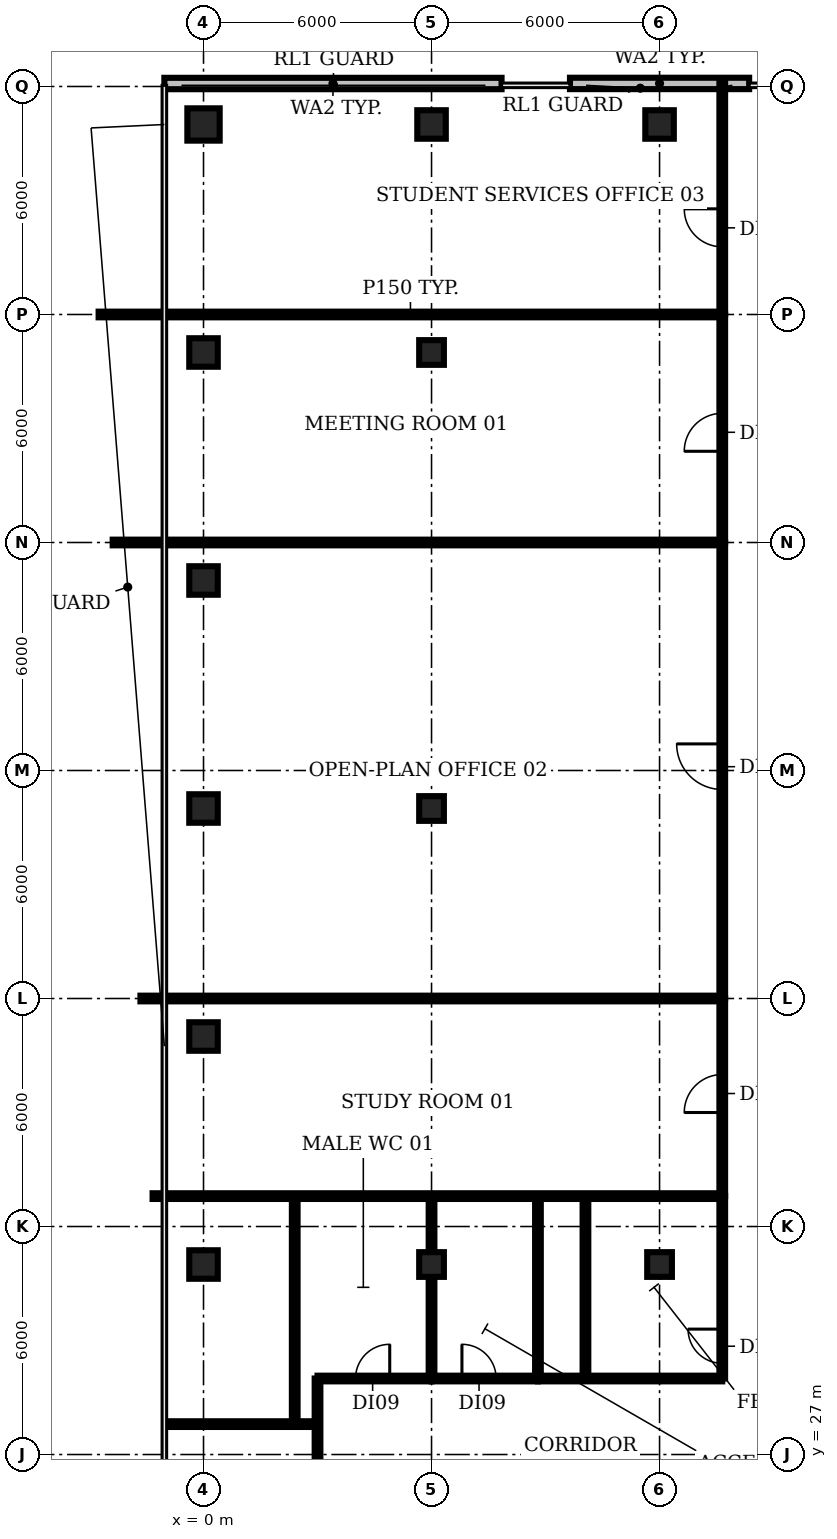
"""IFC4 building model, lengths in metres.
Left out: names, types, materials, properties, quantities, classifications, styles, units other than length and angle.
Written with IfcOpenShell. Run it as: python <this file> out.ifc"""

import sys

from ifc_helpers import new_model, si_unit, direction, frame, frame_2d, origin, origin_2d, place, context, subcontext, project, spatial, rectangle, circle, extrude, element, fill, save


model = new_model("IFC4")
c1 = context("Model", 3, precision=1e-05, world=origin(), true_north=direction((0.0, 1.0)))
c2 = subcontext(c1, "Body", "Model", "MODEL_VIEW")
j1 = project(units=[si_unit("LENGTHUNIT", "METRE"), si_unit("PLANEANGLEUNIT", "RADIAN")], contexts=[c1])
p1 = place(None, origin())
s1 = spatial("IfcSite", under=j1, at=p1, CompositionType="ELEMENT")
p2 = place(p1, origin())
s2 = spatial("IfcBuilding", under=s1, at=p2, CompositionType="ELEMENT")
p3 = place(p2, frame((0.0, 0.0, 302.0)))
s3 = spatial("IfcBuildingStorey", under=s2, at=p3, CompositionType="ELEMENT", Elevation=302.0)
for number, where, z_axis, x_axis in (
    (1, (0.0, 32.0, 0.0), (0.0, 0.0, 1.0), (1.0, 0.0, 0.0)),
    (2, (0.0, 38.0, 0.0), (0.0, 0.0, 1.0), (1.0, 0.0, 0.0)),
    (3, (0.0, 44.0, 0.0), (0.0, 0.0, 1.0), (1.0, 0.0, 0.0)),
    (4, (0.0, 50.0, 0.0), (0.0, 0.0, 1.0), (1.0, 0.0, 0.0)),
    (5, (0.0, 56.0, 0.0), (0.0, 0.0, 1.0), (1.0, 0.0, 0.0)),
):
    element("IfcColumn", number, at=place(p3, frame(where, z_axis=z_axis, x_axis=x_axis)), inside=s3, PredefinedType="COLUMN", context=c2, shape_type="SweptSolid", body=[
        extrude(rectangle(XDim=0.75, YDim=0.75, at=origin_2d()), origin(), (0.0, 0.0, 1.0), 3.85),
    ])
p4 = place(p3, frame((0.0, 62.0, 0.0), z_axis=(0.0, 0.0, 1.0), x_axis=(1.0, 0.0, 0.0)))
e6 = element("IfcColumn", 6, at=p4, inside=s3, PredefinedType="COLUMN", context=c2, shape_type="SweptSolid", body=[
    extrude(circle(Radius=0.425, at=origin_2d()), origin(), (0.0, 0.0, 1.0), 3.85),
])
for number, where, z_axis, x_axis in (
    (7, (6.0, 32.0, 0.0), (0.0, 0.0, 1.0), (1.0, 0.0, 0.0)),
    (8, (6.0, 44.0, 0.0), (0.0, 0.0, 1.0), (1.0, 0.0, 0.0)),
    (9, (6.0, 56.0, 0.0), (0.0, 0.0, 1.0), (1.0, 0.0, 0.0)),
):
    element("IfcColumn", number, at=place(p3, frame(where, z_axis=z_axis, x_axis=x_axis)), inside=s3, PredefinedType="COLUMN", context=c2, shape_type="SweptSolid", body=[
        extrude(rectangle(XDim=0.65, YDim=0.65, at=origin_2d()), origin(), (0.0, 0.0, 1.0), 3.85),
    ])
p5 = place(p3, frame((6.0, 62.0, 0.0), z_axis=(0.0, 0.0, 1.0), x_axis=(1.0, 0.0, 0.0)))
e10 = element("IfcColumn", 10, at=p5, inside=s3, PredefinedType="COLUMN", context=c2, shape_type="SweptSolid", body=[
    extrude(rectangle(XDim=0.75, YDim=0.75, at=origin_2d()), origin(), (0.0, 0.0, 1.0), 3.85),
])
p6 = place(p3, frame((12.0, 32.0, 0.0), z_axis=(0.0, 0.0, 1.0), x_axis=(1.0, 0.0, 0.0)))
e11 = element("IfcColumn", 11, at=p6, inside=s3, PredefinedType="COLUMN", context=c2, shape_type="SweptSolid", body=[
    extrude(rectangle(XDim=0.65, YDim=0.65, at=origin_2d()), origin(), (0.0, 0.0, 1.0), 3.85),
])
p7 = place(p3, frame((12.0, 62.0, 0.0), z_axis=(0.0, 0.0, 1.0), x_axis=(1.0, 0.0, 0.0)))
e12 = element("IfcColumn", 12, at=p7, inside=s3, PredefinedType="COLUMN", context=c2, shape_type="SweptSolid", body=[
    extrude(rectangle(XDim=0.75, YDim=0.75, at=origin_2d()), origin(), (0.0, 0.0, 1.0), 3.85),
])
p8 = place(p3, frame((14.357, 63.08, 0.0), z_axis=(0.0, 0.0, 1.0), x_axis=(-1.0, 0.0, 0.0)))
e13 = element("IfcWall", 13, at=p8, inside=s3, PredefinedType="SOLIDWALL", context=c2, shape_type="SweptSolid", body=[
    extrude(rectangle(XDim=4.715, YDim=0.3, at=frame_2d((2.357, 0.0))), origin(), (0.0, 0.0, 1.0), 3.85),
])
p9 = place(p3, frame((7.843, 63.078, 0.0), z_axis=(0.0, 0.0, 1.0), x_axis=(-1.0, 0.0, 0.0)))
e14 = element("IfcWall", 14, at=p9, inside=s3, PredefinedType="SOLIDWALL", context=c2, shape_type="SweptSolid", body=[
    extrude(rectangle(XDim=8.873, YDim=0.3, at=frame_2d((4.436, 0.0))), origin(), (0.0, 0.0, 1.0), 3.85),
])
p10 = place(p3, frame((-2.76, 57.0, 0.0), z_axis=(0.0, 0.0, 1.0), x_axis=(1.0, 0.0, 0.0)))
e15 = element("IfcWall", 15, at=p10, inside=s3, PredefinedType="PARTITIONING", context=c2, shape_type="SweptSolid", body=[
    extrude(rectangle(XDim=16.41, YDim=0.15, at=frame_2d((8.205, 0.0))), origin(), (0.0, 0.0, 1.0), 2.9),
])
p11 = place(p3, frame((-2.39, 51.0, 0.0), z_axis=(0.0, 0.0, 1.0), x_axis=(1.0, 0.0, 0.0)))
e16 = element("IfcWall", 16, at=p11, inside=s3, PredefinedType="PARTITIONING", context=c2, shape_type="SweptSolid", body=[
    extrude(rectangle(XDim=16.04, YDim=0.15, at=frame_2d((8.02, 0.0))), origin(), (0.0, 0.0, 1.0), 2.9),
])
p12 = place(p3, frame((-1.66, 39.0, 0.0), z_axis=(0.0, 0.0, 1.0), x_axis=(1.0, 0.0, 0.0)))
e17 = element("IfcWall", 17, at=p12, inside=s3, PredefinedType="PARTITIONING", context=c2, shape_type="SweptSolid", body=[
    extrude(rectangle(XDim=15.31, YDim=0.15, at=frame_2d((7.655, 0.0))), origin(), (0.0, 0.0, 1.0), 2.9),
])
p13 = place(p3, frame((-1.34, 33.8, 0.0), z_axis=(0.0, 0.0, 1.0), x_axis=(1.0, 0.0, 0.0)))
e18 = element("IfcWall", 18, at=p13, inside=s3, PredefinedType="PARTITIONING", context=c2, shape_type="SweptSolid", body=[
    extrude(rectangle(XDim=14.99, YDim=0.15, at=frame_2d((7.495, 0.0))), origin(), (0.0, 0.0, 1.0), 2.9),
])
p14 = place(p3, frame((-0.98, 27.8, 0.0), z_axis=(0.0, 0.0, 1.0), x_axis=(1.0, 0.0, 0.0)))
e19 = element("IfcWall", 19, at=p14, inside=s3, PredefinedType="PARTITIONING", context=c2, shape_type="SweptSolid", body=[
    extrude(rectangle(XDim=3.98, YDim=0.15, at=frame_2d((1.99, 0.0))), origin(), (0.0, 0.0, 1.0), 2.9),
])
p15 = place(p3, frame((2.4, 27.8, 0.0), z_axis=(0.0, 0.0, 1.0), x_axis=(0.0, 1.0, 0.0)))
e20 = element("IfcWall", 20, at=p15, inside=s3, PredefinedType="PARTITIONING", context=c2, shape_type="SweptSolid", body=[
    extrude(rectangle(XDim=6.0, YDim=0.15, at=frame_2d((3.0, 0.0))), origin(), (0.0, 0.0, 1.0), 2.9),
])
p16 = place(p3, frame((3.0, 25.1, 0.0), z_axis=(0.0, 0.0, 1.0), x_axis=(0.0, 1.0, 0.0)))
e21 = element("IfcWall", 21, at=p16, inside=s3, PredefinedType="PARTITIONING", context=c2, shape_type="SweptSolid", body=[
    extrude(rectangle(XDim=3.9, YDim=0.15, at=frame_2d((1.95, 0.0))), origin(), (0.0, 0.0, 1.0), 2.9),
])
p17 = place(p3, frame((3.0, 29.0, 0.0), z_axis=(0.0, 0.0, 1.0), x_axis=(1.0, 0.0, 0.0)))
e22 = element("IfcWall", 22, at=p17, inside=s3, PredefinedType="PARTITIONING", context=c2, shape_type="SweptSolid", body=[
    extrude(rectangle(XDim=3.0, YDim=0.15, at=frame_2d((1.5, 0.0))), origin(), (0.0, 0.0, 1.0), 2.9),
])
p18 = place(p17, frame((1.0, 0.0, 0.0)))
e23 = element("IfcOpeningElement", 23, at=p18, cuts=e22, PredefinedType="OPENING", context=c2, shape_type="SweptSolid", body=[
    extrude(rectangle(XDim=0.9, YDim=2.1, at=frame_2d((0.45, 1.05))), frame((0.0, 0.085, 0.0), z_axis=(0.0, -1.0, 0.0), x_axis=(1.0, 0.0, 0.0)), (0.0, 0.0, 1.0), 0.17),
])
p19 = place(p3, frame((6.0, 29.0, 0.0), z_axis=(0.0, 0.0, 1.0), x_axis=(0.0, 1.0, 0.0)))
e24 = element("IfcWall", 24, at=p19, inside=s3, PredefinedType="PARTITIONING", context=c2, shape_type="SweptSolid", body=[
    extrude(rectangle(XDim=4.8, YDim=0.15, at=frame_2d((2.4, 0.0))), origin(), (0.0, 0.0, 1.0), 2.9),
])
p20 = place(p3, frame((6.0, 29.0, 0.0), z_axis=(0.0, 0.0, 1.0), x_axis=(1.0, 0.0, 0.0)))
e25 = element("IfcWall", 25, at=p20, inside=s3, PredefinedType="PARTITIONING", context=c2, shape_type="SweptSolid", body=[
    extrude(rectangle(XDim=2.8, YDim=0.15, at=frame_2d((1.4, 0.0))), origin(), (0.0, 0.0, 1.0), 2.9),
])
p21 = place(p20, frame((0.8, 0.0, 0.0)))
e26 = element("IfcOpeningElement", 26, at=p21, cuts=e25, PredefinedType="OPENING", context=c2, shape_type="SweptSolid", body=[
    extrude(rectangle(XDim=0.9, YDim=2.1, at=frame_2d((0.45, 1.05))), frame((0.0, 0.085, 0.0), z_axis=(0.0, -1.0, 0.0), x_axis=(1.0, 0.0, 0.0)), (0.0, 0.0, 1.0), 0.17),
])
p22 = place(p3, frame((8.8, 29.0, 0.0), z_axis=(0.0, 0.0, 1.0), x_axis=(0.0, 1.0, 0.0)))
e27 = element("IfcWall", 27, at=p22, inside=s3, PredefinedType="PARTITIONING", context=c2, shape_type="SweptSolid", body=[
    extrude(rectangle(XDim=4.8, YDim=0.15, at=frame_2d((2.4, 0.0))), origin(), (0.0, 0.0, 1.0), 2.9),
])
p23 = place(p3, frame((8.8, 29.0, 0.0), z_axis=(0.0, 0.0, 1.0), x_axis=(1.0, 0.0, 0.0)))
e28 = element("IfcWall", 28, at=p23, inside=s3, PredefinedType="PARTITIONING", context=c2, shape_type="SweptSolid", body=[
    extrude(rectangle(XDim=4.85, YDim=0.15, at=frame_2d((2.425, 0.0))), origin(), (0.0, 0.0, 1.0), 2.9),
])
p24 = place(p3, frame((10.05, 29.0, 0.0), z_axis=(0.0, 0.0, 1.0), x_axis=(0.0, 1.0, 0.0)))
e29 = element("IfcWall", 29, at=p24, inside=s3, PredefinedType="PARTITIONING", context=c2, shape_type="SweptSolid", body=[
    extrude(rectangle(XDim=4.8, YDim=0.15, at=frame_2d((2.4, 0.0))), origin(), (0.0, 0.0, 1.0), 2.9),
])
p25 = place(p3, frame((13.65, 29.0, 0.0), z_axis=(0.0, 0.0, 1.0), x_axis=(0.0, 1.0, 0.0)))
e30 = element("IfcWall", 30, at=p25, inside=s3, PredefinedType="PARTITIONING", context=c2, shape_type="SweptSolid", body=[
    extrude(rectangle(XDim=4.8, YDim=0.15, at=frame_2d((2.4, 0.0))), origin(), (0.0, 0.0, 1.0), 2.9),
])
p26 = place(p25, frame((0.4, 0.0, 0.0)))
e31 = element("IfcOpeningElement", 31, at=p26, cuts=e30, PredefinedType="OPENING", context=c2, shape_type="SweptSolid", body=[
    extrude(rectangle(XDim=0.9, YDim=2.1, at=frame_2d((0.45, 1.05))), frame((0.0, 0.085, 0.0), z_axis=(0.0, -1.0, 0.0), x_axis=(1.0, 0.0, 0.0)), (0.0, 0.0, 1.0), 0.17),
])
p27 = place(p3, frame((13.65, 33.8, 0.0), z_axis=(0.0, 0.0, 1.0), x_axis=(0.0, 1.0, 0.0)))
e32 = element("IfcWall", 32, at=p27, inside=s3, PredefinedType="PARTITIONING", context=c2, shape_type="SweptSolid", body=[
    extrude(rectangle(XDim=5.2, YDim=0.15, at=frame_2d((2.6, 0.0))), origin(), (0.0, 0.0, 1.0), 2.9),
])
p28 = place(p27, frame((2.2, 0.0, 0.0)))
e33 = element("IfcOpeningElement", 33, at=p28, cuts=e32, PredefinedType="OPENING", context=c2, shape_type="SweptSolid", body=[
    extrude(rectangle(XDim=1.0, YDim=2.1, at=frame_2d((0.5, 1.05))), frame((0.0, 0.085, 0.0), z_axis=(0.0, -1.0, 0.0), x_axis=(1.0, 0.0, 0.0)), (0.0, 0.0, 1.0), 0.17),
])
p29 = place(p3, frame((13.65, 39.0, 0.0), z_axis=(0.0, 0.0, 1.0), x_axis=(0.0, 1.0, 0.0)))
e34 = element("IfcWall", 34, at=p29, inside=s3, PredefinedType="PARTITIONING", context=c2, shape_type="SweptSolid", body=[
    extrude(rectangle(XDim=12.0, YDim=0.15, at=frame_2d((6.0, 0.0))), origin(), (0.0, 0.0, 1.0), 2.9),
])
p30 = place(p29, frame((5.5, 0.0, 0.0)))
e35 = element("IfcOpeningElement", 35, at=p30, cuts=e34, PredefinedType="OPENING", context=c2, shape_type="SweptSolid", body=[
    extrude(rectangle(XDim=1.2, YDim=2.1, at=frame_2d((0.6, 1.05))), frame((0.0, 0.085, 0.0), z_axis=(0.0, -1.0, 0.0), x_axis=(1.0, 0.0, 0.0)), (0.0, 0.0, 1.0), 0.17),
])
p31 = place(p3, frame((13.65, 51.0, 0.0), z_axis=(0.0, 0.0, 1.0), x_axis=(0.0, 1.0, 0.0)))
e36 = element("IfcWall", 36, at=p31, inside=s3, PredefinedType="PARTITIONING", context=c2, shape_type="SweptSolid", body=[
    extrude(rectangle(XDim=6.0, YDim=0.15, at=frame_2d((3.0, 0.0))), origin(), (0.0, 0.0, 1.0), 2.9),
])
p32 = place(p31, frame((2.4, 0.0, 0.0)))
e37 = element("IfcOpeningElement", 37, at=p32, cuts=e36, PredefinedType="OPENING", context=c2, shape_type="SweptSolid", body=[
    extrude(rectangle(XDim=1.0, YDim=2.1, at=frame_2d((0.5, 1.05))), frame((0.0, 0.085, 0.0), z_axis=(0.0, -1.0, 0.0), x_axis=(1.0, 0.0, 0.0)), (0.0, 0.0, 1.0), 0.17),
])
p33 = place(p3, frame((13.65, 57.0, 0.0), z_axis=(0.0, 0.0, 1.0), x_axis=(0.0, 1.0, 0.0)))
e38 = element("IfcWall", 38, at=p33, inside=s3, PredefinedType="PARTITIONING", context=c2, shape_type="SweptSolid", body=[
    extrude(rectangle(XDim=6.09, YDim=0.15, at=frame_2d((3.045, 0.0))), origin(), (0.0, 0.0, 1.0), 2.9),
])
p34 = place(p33, frame((1.78, 0.0, 0.0)))
e39 = element("IfcOpeningElement", 39, at=p34, cuts=e38, PredefinedType="OPENING", context=c2, shape_type="SweptSolid", body=[
    extrude(rectangle(XDim=1.0, YDim=2.1, at=frame_2d((0.5, 1.05))), frame((0.0, 0.085, 0.0), z_axis=(0.0, -1.0, 0.0), x_axis=(1.0, 0.0, 0.0)), (0.0, 0.0, 1.0), 0.17),
])
p35 = place(p18, origin())
e40 = element("IfcDoor", 40, at=p35, inside=s3, OperationType="SINGLE_SWING_RIGHT", PredefinedType="DOOR", context=c2, shape_type="SweptSolid", body=[
    extrude(rectangle(XDim=0.9, YDim=2.1, at=frame_2d((0.45, 1.05))), frame((0.0, 0.025, 0.0), z_axis=(0.0, -1.0, 0.0), x_axis=(1.0, 0.0, 0.0)), (0.0, 0.0, 1.0), 0.05),
])
fill(e23, e40)
p36 = place(p21, origin())
e41 = element("IfcDoor", 41, at=p36, inside=s3, OperationType="SINGLE_SWING_LEFT", PredefinedType="DOOR", context=c2, shape_type="SweptSolid", body=[
    extrude(rectangle(XDim=0.9, YDim=2.1, at=frame_2d((0.45, 1.05))), frame((0.0, 0.025, 0.0), z_axis=(0.0, -1.0, 0.0), x_axis=(1.0, 0.0, 0.0)), (0.0, 0.0, 1.0), 0.05),
])
fill(e26, e41)
p37 = place(p26, origin())
e42 = element("IfcDoor", 42, at=p37, inside=s3, OperationType="SINGLE_SWING_RIGHT", PredefinedType="DOOR", context=c2, shape_type="SweptSolid", body=[
    extrude(rectangle(XDim=0.9, YDim=2.1, at=frame_2d((0.45, 1.05))), frame((0.0, 0.025, 0.0), z_axis=(0.0, -1.0, 0.0), x_axis=(1.0, 0.0, 0.0)), (0.0, 0.0, 1.0), 0.05),
])
fill(e31, e42)
p38 = place(p28, origin())
e43 = element("IfcDoor", 43, at=p38, inside=s3, OperationType="SINGLE_SWING_LEFT", PredefinedType="DOOR", context=c2, shape_type="SweptSolid", body=[
    extrude(rectangle(XDim=1.0, YDim=2.1, at=frame_2d((0.5, 1.05))), frame((0.0, 0.025, 0.0), z_axis=(0.0, -1.0, 0.0), x_axis=(1.0, 0.0, 0.0)), (0.0, 0.0, 1.0), 0.05),
])
fill(e33, e43)
p39 = place(p30, origin())
e44 = element("IfcDoor", 44, at=p39, inside=s3, OperationType="SINGLE_SWING_RIGHT", PredefinedType="DOOR", context=c2, shape_type="SweptSolid", body=[
    extrude(rectangle(XDim=1.2, YDim=2.1, at=frame_2d((0.6, 1.05))), frame((0.0, 0.025, 0.0), z_axis=(0.0, -1.0, 0.0), x_axis=(1.0, 0.0, 0.0)), (0.0, 0.0, 1.0), 0.05),
])
fill(e35, e44)
p40 = place(p32, origin())
e45 = element("IfcDoor", 45, at=p40, inside=s3, OperationType="SINGLE_SWING_LEFT", PredefinedType="DOOR", context=c2, shape_type="SweptSolid", body=[
    extrude(rectangle(XDim=1.0, YDim=2.1, at=frame_2d((0.5, 1.05))), frame((0.0, 0.025, 0.0), z_axis=(0.0, -1.0, 0.0), x_axis=(1.0, 0.0, 0.0)), (0.0, 0.0, 1.0), 0.05),
])
fill(e37, e45)
p41 = place(p34, origin())
e46 = element("IfcDoor", 46, at=p41, inside=s3, OperationType="SINGLE_SWING_RIGHT", PredefinedType="DOOR", context=c2, shape_type="SweptSolid", body=[
    extrude(rectangle(XDim=1.0, YDim=2.1, at=frame_2d((0.5, 1.05))), frame((0.0, 0.025, 0.0), z_axis=(0.0, -1.0, 0.0), x_axis=(1.0, 0.0, 0.0)), (0.0, 0.0, 1.0), 0.05),
])
fill(e39, e46)
save(model, sys.argv[1])
